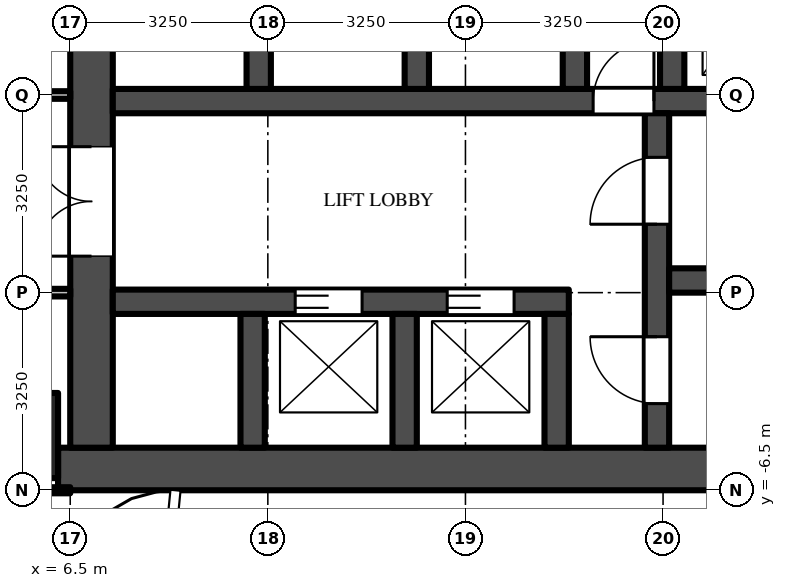
"""IFC4 building model, lengths in metres.
Left out: names, types, materials, properties, quantities, classifications, styles, units other than length and angle.
Written with IfcOpenShell. Run it as: python <this file> out.ifc"""

import sys

from ifc_helpers import new_model, si_unit, direction, frame, frame_2d, origin, origin_2d, place, context, subcontext, project, spatial, rectangle, extrude, source, transform, mapped, element, fill, save


model = new_model("IFC4")
c1 = context("Model", 3, precision=1e-05, world=origin(), true_north=direction((0.0, 1.0)))
c2 = subcontext(c1, "Body", "Model", "MODEL_VIEW")
j1 = project(units=[si_unit("LENGTHUNIT", "METRE"), si_unit("PLANEANGLEUNIT", "RADIAN")], contexts=[c1])
p1 = place(None, origin())
s1 = spatial("IfcSite", under=j1, at=p1, CompositionType="ELEMENT")
p2 = place(p1, origin())
s2 = spatial("IfcBuilding", under=s1, at=p2, CompositionType="ELEMENT")
p3 = place(p2, frame((0.0, 0.0, 70.0)))
s3 = spatial("IfcBuildingStorey", under=s2, at=p3, CompositionType="ELEMENT", Elevation=70.0)
m1 = source(origin(), c2, "Body", "SweptSolid", [
    extrude(rectangle(XDim=1.4, YDim=1.4, at=origin_2d()), origin(), (0.0, 0.0, 1.0), 4.5),
])
p4 = place(p3, frame((5.6, -5.6, 0.0), z_axis=(0.0, 0.0, 1.0), x_axis=(1.0, 0.0, 0.0)))
e1 = element("IfcColumn", 1, at=p4, inside=s3, PredefinedType="COLUMN", context=c2, shape_type="MappedRepresentation", body=[
    mapped(m1, transform((0.0, 0.0, 0.0))),
])
m2 = source(origin(), c2, "Body", "SweptSolid", [
    extrude(rectangle(XDim=16.45, YDim=0.7, at=frame_2d((8.225, 0.0))), origin(), (0.0, 0.0, 1.0), 4.25),
])
p5 = place(p3, frame((6.3, -6.15, 0.0), z_axis=(0.0, 0.0, 1.0), x_axis=(1.0, 0.0, 0.0)))
e2 = element("IfcWall", 2, at=p5, inside=s3, PredefinedType="SHEAR", context=c2, shape_type="MappedRepresentation", body=[
    mapped(m2, transform((0.0, 0.0, 0.0))),
])
m3 = source(origin(), c2, "Body", "SweptSolid", [
    extrude(rectangle(XDim=9.05, YDim=0.7, at=frame_2d((4.525, 0.0))), origin(), (0.0, 0.0, 1.0), 4.25),
])
p6 = place(p3, frame((6.85, -5.8, 0.0), z_axis=(0.0, 0.0, 1.0), x_axis=(0.0, 1.0, 0.0)))
e3 = element("IfcWall", 3, at=p6, inside=s3, PredefinedType="SHEAR", context=c2, shape_type="MappedRepresentation", body=[
    mapped(m3, transform((0.0, 0.0, 0.0))),
])
m4 = source(origin(), c2, "Body", "SweptSolid", [
    extrude(rectangle(XDim=1.8, YDim=2.1, at=frame_2d((0.9, 1.05))), frame((0.0, 0.36, 0.0), z_axis=(0.0, -1.0, 0.0), x_axis=(1.0, 0.0, 0.0)), (0.0, 0.0, 1.0), 0.72),
])
p7 = place(p6, frame((3.15, 0.0, 0.0)))
e4 = element("IfcOpeningElement", 4, at=p7, cuts=e3, PredefinedType="OPENING", context=c2, shape_type="MappedRepresentation", body=[
    mapped(m4, transform((0.0, 0.0, 0.0))),
])
m5 = source(origin(), c2, "Body", "SweptSolid", [
    extrude(rectangle(XDim=7.5, YDim=0.4, at=frame_2d((3.75, 0.0))), origin(), (0.0, 0.0, 1.0), 4.25),
])
p8 = place(p3, frame((7.2, -3.4, 0.0), z_axis=(0.0, 0.0, 1.0), x_axis=(1.0, 0.0, 0.0)))
e5 = element("IfcWall", 5, at=p8, inside=s3, PredefinedType="SHEAR", context=c2, shape_type="MappedRepresentation", body=[
    mapped(m5, transform((0.0, 0.0, 0.0))),
])
m6 = source(origin(), c2, "Body", "SweptSolid", [
    extrude(rectangle(XDim=1.1, YDim=2.1, at=frame_2d((0.55, 1.05))), frame((0.0, 0.21, 0.0), z_axis=(0.0, -1.0, 0.0), x_axis=(1.0, 0.0, 0.0)), (0.0, 0.0, 1.0), 0.42),
])
p9 = place(p8, frame((3.0, 0.0, 0.0)))
e6 = element("IfcOpeningElement", 6, at=p9, cuts=e5, PredefinedType="OPENING", context=c2, shape_type="MappedRepresentation", body=[
    mapped(m6, transform((0.0, 0.0, 0.0))),
])
p10 = place(p8, frame((5.5, 0.0, 0.0)))
e7 = element("IfcOpeningElement", 7, at=p10, cuts=e5, PredefinedType="OPENING", context=c2, shape_type="MappedRepresentation", body=[
    mapped(m6, transform((0.0, 0.0, 0.0))),
])
m7 = source(origin(), c2, "Body", "SweptSolid", [
    extrude(rectangle(XDim=14.85, YDim=0.4, at=frame_2d((7.425, 0.0))), origin(), (0.0, 0.0, 1.0), 4.25),
])
p11 = place(p3, frame((7.2, -0.1, 0.0), z_axis=(0.0, 0.0, 1.0), x_axis=(1.0, 0.0, 0.0)))
e8 = element("IfcWall", 8, at=p11, inside=s3, PredefinedType="SHEAR", context=c2, shape_type="MappedRepresentation", body=[
    mapped(m7, transform((0.0, 0.0, 0.0))),
])
m8 = source(origin(), c2, "Body", "SweptSolid", [
    extrude(rectangle(XDim=1.0, YDim=2.1, at=frame_2d((0.5, 1.05))), frame((0.0, 0.21, 0.0), z_axis=(0.0, -1.0, 0.0), x_axis=(1.0, 0.0, 0.0)), (0.0, 0.0, 1.0), 0.42),
])
p12 = place(p11, frame((7.9, 0.0, 0.0)))
e9 = element("IfcOpeningElement", 9, at=p12, cuts=e8, PredefinedType="OPENING", context=c2, shape_type="MappedRepresentation", body=[
    mapped(m8, transform((0.0, 0.0, 0.0))),
])
m9 = source(origin(), c2, "Body", "SweptSolid", [
    extrude(rectangle(XDim=5.5, YDim=0.4, at=frame_2d((2.75, 0.0))), origin(), (0.0, 0.0, 1.0), 4.25),
])
p13 = place(p3, frame((16.15, -5.8, 0.0), z_axis=(0.0, 0.0, 1.0), x_axis=(0.0, 1.0, 0.0)))
e10 = element("IfcWall", 10, at=p13, inside=s3, PredefinedType="SHEAR", context=c2, shape_type="MappedRepresentation", body=[
    mapped(m9, transform((0.0, 0.0, 0.0))),
])
p14 = place(p13, frame((0.725, 0.0, 0.0)))
e11 = element("IfcOpeningElement", 11, at=p14, cuts=e10, PredefinedType="OPENING", context=c2, shape_type="MappedRepresentation", body=[
    mapped(m6, transform((0.0, 0.0, 0.0))),
])
p15 = place(p13, frame((3.675, 0.0, 0.0)))
e12 = element("IfcOpeningElement", 12, at=p15, cuts=e10, PredefinedType="OPENING", context=c2, shape_type="MappedRepresentation", body=[
    mapped(m6, transform((0.0, 0.0, 0.0))),
])
m10 = source(origin(), c2, "Body", "SweptSolid", [
    extrude(rectangle(XDim=5.7, YDim=0.4, at=frame_2d((2.85, 0.0))), origin(), (0.0, 0.0, 1.0), 4.25),
])
p16 = place(p3, frame((16.35, -3.05, 0.0), z_axis=(0.0, 0.0, 1.0), x_axis=(1.0, 0.0, 0.0)))
e13 = element("IfcWall", 13, at=p16, inside=s3, PredefinedType="SHEAR", context=c2, shape_type="MappedRepresentation", body=[
    mapped(m10, transform((0.0, 0.0, 0.0))),
])
m11 = source(origin(), c2, "Body", "SweptSolid", [
    extrude(rectangle(XDim=2.2, YDim=0.4, at=frame_2d((1.1, 0.0))), origin(), (0.0, 0.0, 1.0), 4.25),
])
for number, where, z_axis, x_axis in (
    (14, (9.5, -5.8, 0.0), (0.0, 0.0, 1.0), (0.0, 1.0, 0.0)),
    (15, (12.0, -5.8, 0.0), (0.0, 0.0, 1.0), (0.0, 1.0, 0.0)),
    (16, (14.5, -5.8, 0.0), (0.0, 0.0, 1.0), (0.0, 1.0, 0.0)),
):
    element("IfcWall", number, at=place(p3, frame(where, z_axis=z_axis, x_axis=x_axis)), inside=s3, PredefinedType="SHEAR", context=c2, shape_type="MappedRepresentation", body=[
        mapped(m11, transform((0.0, 0.0, 0.0))),
    ])
m12 = source(origin(), c2, "Body", "SweptSolid", [
    extrude(rectangle(XDim=2.45, YDim=0.4, at=frame_2d((1.225, 0.0))), origin(), (0.0, 0.0, 1.0), 4.25),
])
for number, where, z_axis, x_axis in (
    (17, (9.6, 0.1, 0.0), (0.0, 0.0, 1.0), (0.0, 1.0, 0.0)),
    (18, (12.2, 0.1, 0.0), (0.0, 0.0, 1.0), (0.0, 1.0, 0.0)),
    (19, (14.8, 0.1, 0.0), (0.0, 0.0, 1.0), (0.0, 1.0, 0.0)),
    (20, (16.4, 0.1, 0.0), (0.0, 0.0, 1.0), (0.0, 1.0, 0.0)),
):
    element("IfcWall", number, at=place(p3, frame(where, z_axis=z_axis, x_axis=x_axis)), inside=s3, PredefinedType="SHEAR", context=c2, shape_type="MappedRepresentation", body=[
        mapped(m12, transform((0.0, 0.0, 0.0))),
    ])
m13 = source(origin(), c2, "Body", "SweptSolid", [
    extrude(rectangle(XDim=5.238, YDim=0.1, at=frame_2d((2.619, 0.0))), origin(), (0.0, 0.0, 1.0), 3.33),
])
p17 = place(p3, frame((1.262, -6.5, 0.0), z_axis=(0.0, 0.0, 1.0), x_axis=(1.0, 0.0, 0.0)))
e21 = element("IfcWall", 21, at=p17, inside=s3, PredefinedType="PARTITIONING", context=c2, shape_type="MappedRepresentation", body=[
    mapped(m13, transform((0.0, 0.0, 0.0))),
])
m14 = source(origin(), c2, "Body", "SweptSolid", [
    extrude(rectangle(XDim=5.363, YDim=0.125, at=frame_2d((2.681, 0.0))), origin(), (0.0, 0.0, 1.0), 3.468),
])
p18 = place(p3, frame((6.5, -3.25, 0.0), z_axis=(0.0, 0.0, 1.0), x_axis=(-1.0, 0.0, 0.0)))
e22 = element("IfcWall", 22, at=p18, inside=s3, PredefinedType="PARTITIONING", context=c2, shape_type="MappedRepresentation", body=[
    mapped(m14, transform((0.0, 0.0, 0.0))),
])
m15 = source(origin(), c2, "Body", "SweptSolid", [
    extrude(rectangle(XDim=1.1, YDim=2.1, at=frame_2d((0.55, 1.05))), frame((0.0, 0.073, 0.0), z_axis=(0.0, -1.0, 0.0), x_axis=(1.0, 0.0, 0.0)), (0.0, 0.0, 1.0), 0.145),
])
p19 = place(p18, frame((0.35, 0.0, 0.0)))
e23 = element("IfcOpeningElement", 23, at=p19, cuts=e22, PredefinedType="OPENING", context=c2, shape_type="MappedRepresentation", body=[
    mapped(m15, transform((0.0, 0.0, 0.0))),
])
p20 = place(p3, frame((6.5, 0.0, 0.0), z_axis=(0.0, 0.0, 1.0), x_axis=(-1.0, 0.0, 0.0)))
e24 = element("IfcWall", 24, at=p20, inside=s3, PredefinedType="PARTITIONING", context=c2, shape_type="MappedRepresentation", body=[
    mapped(m14, transform((0.0, 0.0, 0.0))),
])
m16 = source(origin(), c2, "Body", "SweptSolid", [
    extrude(rectangle(XDim=1.0, YDim=2.1, at=frame_2d((0.5, 1.05))), frame((0.0, 0.073, 0.0), z_axis=(0.0, -1.0, 0.0), x_axis=(1.0, 0.0, 0.0)), (0.0, 0.0, 1.0), 0.145),
])
p21 = place(p20, frame((3.95, 0.0, 0.0)))
e25 = element("IfcOpeningElement", 25, at=p21, cuts=e24, PredefinedType="OPENING", context=c2, shape_type="MappedRepresentation", body=[
    mapped(m16, transform((0.0, 0.0, 0.0))),
])
m17 = source(origin(), c2, "Body", "SweptSolid", [
    extrude(rectangle(XDim=1.1, YDim=2.1, at=frame_2d((0.55, 1.05))), frame((0.0, 0.025, 0.0), z_axis=(0.0, -1.0, 0.0), x_axis=(1.0, 0.0, 0.0)), (0.0, 0.0, 1.0), 0.05),
])
p22 = place(p9, origin())
e26 = element("IfcDoor", 26, at=p22, inside=s3, OperationType="DOUBLE_DOOR_SLIDING", PredefinedType="DOOR", context=c2, shape_type="MappedRepresentation", body=[
    mapped(m17, transform((0.0, 0.0, 0.0))),
])
fill(e6, e26)
p23 = place(p10, origin())
e27 = element("IfcDoor", 27, at=p23, inside=s3, OperationType="DOUBLE_DOOR_SLIDING", PredefinedType="DOOR", context=c2, shape_type="MappedRepresentation", body=[
    mapped(m17, transform((0.0, 0.0, 0.0))),
])
fill(e7, e27)
m18 = source(origin(), c2, "Body", "SweptSolid", [
    extrude(rectangle(XDim=1.8, YDim=2.1, at=frame_2d((0.9, 1.05))), frame((0.0, -0.275, 0.0), z_axis=(0.0, -1.0, 0.0), x_axis=(1.0, 0.0, 0.0)), (0.0, 0.0, 1.0), 0.05),
])
p24 = place(p7, origin())
e28 = element("IfcDoor", 28, at=p24, inside=s3, OperationType="DOUBLE_DOOR_SINGLE_SWING", PredefinedType="DOOR", context=c2, shape_type="MappedRepresentation", body=[
    mapped(m18, transform((0.0, 0.0, 0.0))),
])
fill(e4, e28)
p25 = place(p14, origin())
e29 = element("IfcDoor", 29, at=p25, inside=s3, OperationType="SINGLE_SWING_RIGHT", PredefinedType="DOOR", context=c2, shape_type="MappedRepresentation", body=[
    mapped(m17, transform((0.0, 0.0, 0.0))),
])
fill(e11, e29)
p26 = place(p15, origin())
e30 = element("IfcDoor", 30, at=p26, inside=s3, OperationType="SINGLE_SWING_LEFT", PredefinedType="DOOR", context=c2, shape_type="MappedRepresentation", body=[
    mapped(m17, transform((0.0, 0.0, 0.0))),
])
fill(e12, e30)
m19 = source(origin(), c2, "Body", "SweptSolid", [
    extrude(rectangle(XDim=1.0, YDim=2.1, at=frame_2d((0.5, 1.05))), frame((0.0, 0.025, 0.0), z_axis=(0.0, -1.0, 0.0), x_axis=(1.0, 0.0, 0.0)), (0.0, 0.0, 1.0), 0.05),
])
p27 = place(p12, origin())
e31 = element("IfcDoor", 31, at=p27, inside=s3, OperationType="SINGLE_SWING_RIGHT", PredefinedType="DOOR", context=c2, shape_type="MappedRepresentation", body=[
    mapped(m19, transform((0.0, 0.0, 0.0))),
])
fill(e9, e31)
save(model, sys.argv[1])
